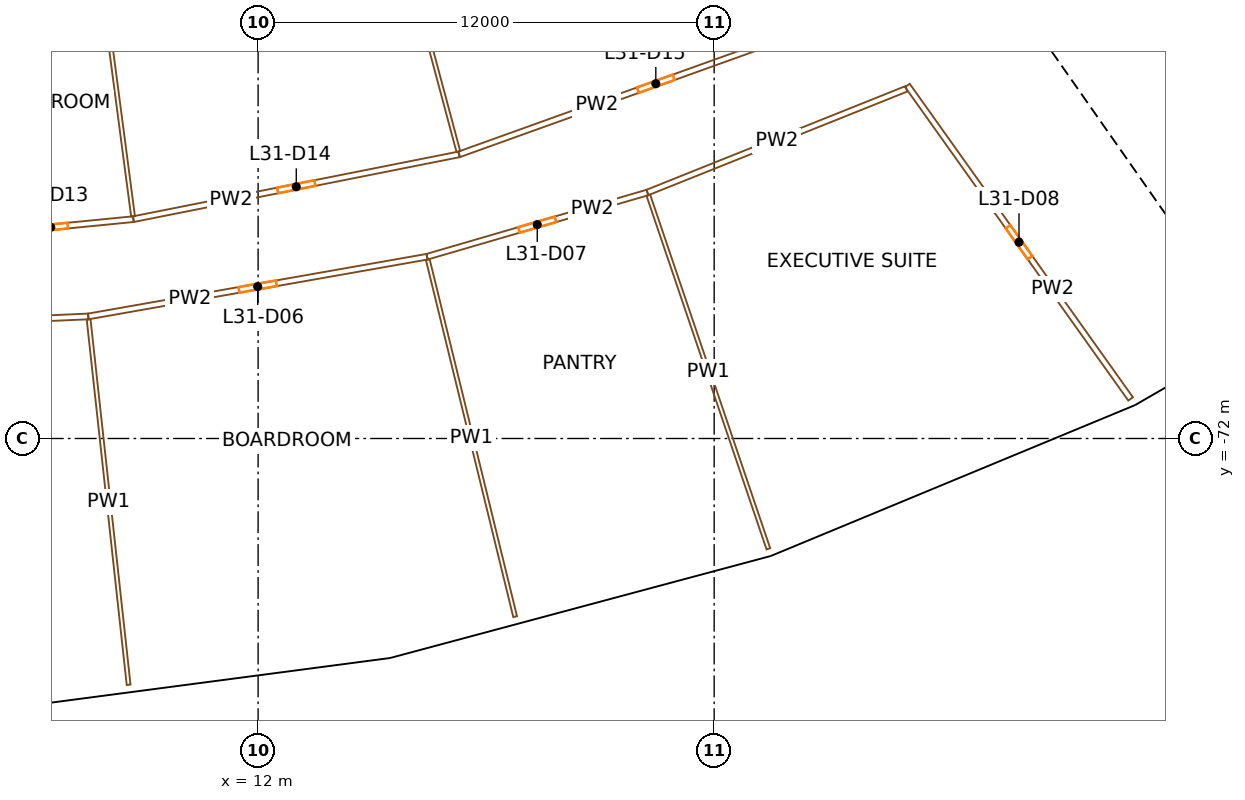
"""IFC4 building model, lengths in metres.
Left out: names, types, materials, properties, quantities, classifications, styles, units other than length and angle.
Written with IfcOpenShell. Run it as: python <this file> out.ifc"""

import sys

from ifc_helpers import new_model, si_unit, direction, frame, frame_2d, origin, origin_2d, place, context, subcontext, project, spatial, rectangle, extrude, element, fill, save


model = new_model("IFC4")
c1 = context("Model", 3, precision=1e-05, world=origin(), true_north=direction((0.0, 1.0)))
c2 = subcontext(c1, "Body", "Model", "MODEL_VIEW")
j1 = project(units=[si_unit("LENGTHUNIT", "METRE"), si_unit("PLANEANGLEUNIT", "RADIAN")], contexts=[c1])
p1 = place(None, origin())
s1 = spatial("IfcSite", under=j1, at=p1, CompositionType="ELEMENT")
p2 = place(p1, origin())
s2 = spatial("IfcBuilding", under=s1, at=p2, CompositionType="ELEMENT")
p3 = place(p2, frame((0.0, 0.0, 136.7)))
s3 = spatial("IfcBuildingStorey", under=s2, at=p3, CompositionType="ELEMENT", Elevation=136.7)
for number, where, z_axis, x_axis in (
    (1, (15.168, -76.256, 0.0), (0.0, 0.0, 1.0), (0.981, 0.195, 0.0)),
    (2, (24.992, -73.624, 0.0), (0.0, 0.0, 1.0), (0.947, 0.321, 0.0)),
    (3, (34.388, -69.732, 0.0), (0.0, 0.0, 1.0), (0.897, 0.442, 0.0)),
):
    element("IfcColumn", number, at=place(p3, frame(where, z_axis=z_axis, x_axis=x_axis)), inside=s3, PredefinedType="COLUMN", context=c2, shape_type="SweptSolid", body=[
        extrude(rectangle(XDim=1.2, YDim=1.5, at=origin_2d()), origin(), (0.0, 0.0, 1.0), 3.8),
    ])
p4 = place(p3, frame((36.717, -66.337, 0.0), z_axis=(0.0, 0.0, 1.0), x_axis=(-0.573577477574, 0.819151315216, 0.0)))
e4 = element("IfcWall", 4, at=p4, inside=s3, PredefinedType="SHEAR", context=c2, shape_type="SweptSolid", body=[
    extrude(rectangle(XDim=14.8, YDim=0.9, at=frame_2d((7.4, 0.0))), origin(), (0.0, 0.0, 1.0), 3.5),
])
p5 = place(p4, frame((6.2, 0.0, 0.0)))
e5 = element("IfcOpeningElement", 5, at=p5, cuts=e4, PredefinedType="OPENING", context=c2, shape_type="SweptSolid", body=[
    extrude(rectangle(XDim=2.4, YDim=2.1, at=frame_2d((1.2, 1.05))), frame((0.0, 0.46, 0.0), z_axis=(0.0, -1.0, 0.0), x_axis=(1.0, 0.0, 0.0)), (0.0, 0.0, 1.0), 0.92),
])
p6 = place(p3, frame((35.221, -63.417, 0.0), z_axis=(0.0, 0.0, 1.0), x_axis=(0.819166993208, 0.573555086491, 0.0)))
e6 = element("IfcWall", 6, at=p6, inside=s3, PredefinedType="SOLIDWALL", context=c2, shape_type="SweptSolid", body=[
    extrude(rectangle(XDim=7.95, YDim=0.3, at=frame_2d((3.975, 0.0))), origin(), (0.0, 0.0, 1.0), 3.5),
])
p7 = place(p3, frame((7.532, -68.789, 0.0), z_axis=(0.0, 0.0, 1.0), x_axis=(-0.999048509506, -0.043612792308, 0.0)))
e7 = element("IfcWall", 7, at=p7, inside=s3, PredefinedType="PARTITIONING", context=c2, shape_type="SweptSolid", body=[
    extrude(rectangle(XDim=9.052, YDim=0.15, at=frame_2d((4.526, 0.0))), origin(), (0.0, 0.0, 1.0), 2.4),
])
p8 = place(p7, frame((4.026, 0.0, 0.0)))
e8 = element("IfcOpeningElement", 8, at=p8, cuts=e7, PredefinedType="OPENING", context=c2, shape_type="SweptSolid", body=[
    extrude(rectangle(XDim=1.0, YDim=2.1, at=frame_2d((0.5, 1.05))), frame((0.0, 0.085, 0.0), z_axis=(0.0, -1.0, 0.0), x_axis=(1.0, 0.0, 0.0)), (0.0, 0.0, 1.0), 0.17),
])
p9 = place(p3, frame((4.369, -66.657, 0.0), z_axis=(0.0, 0.0, 1.0), x_axis=(0.995184826457, 0.098016127192, 0.0)))
e9 = element("IfcWall", 9, at=p9, inside=s3, PredefinedType="PARTITIONING", context=c2, shape_type="SweptSolid", body=[
    extrude(rectangle(XDim=4.371, YDim=0.15, at=frame_2d((2.186, 0.0))), origin(), (0.0, 0.0, 1.0), 2.4),
])
p10 = place(p9, frame((1.736, 0.0, 0.0)))
e10 = element("IfcOpeningElement", 10, at=p10, cuts=e9, PredefinedType="OPENING", context=c2, shape_type="SweptSolid", body=[
    extrude(rectangle(XDim=0.9, YDim=2.1, at=frame_2d((0.45, 1.05))), frame((0.0, 0.085, 0.0), z_axis=(0.0, -1.0, 0.0), x_axis=(1.0, 0.0, 0.0)), (0.0, 0.0, 1.0), 0.17),
])
p11 = place(p3, frame((7.437, -56.491, 0.0), z_axis=(0.0, 0.0, 1.0), x_axis=(0.13053421433, -0.99144380521, 0.0)))
e11 = element("IfcWall", 11, at=p11, inside=s3, PredefinedType="PARTITIONING", context=c2, shape_type="SweptSolid", body=[
    extrude(rectangle(XDim=9.746, YDim=0.1, at=frame_2d((4.873, 0.0))), origin(), (0.0, 0.0, 1.0), 2.4),
])
p12 = place(p3, frame((16.446, -67.217, 0.0), z_axis=(0.0, 0.0, 1.0), x_axis=(-0.984813412134, -0.173616080133, 0.0)))
e12 = element("IfcWall", 12, at=p12, inside=s3, PredefinedType="PARTITIONING", context=c2, shape_type="SweptSolid", body=[
    extrude(rectangle(XDim=9.052, YDim=0.15, at=frame_2d((4.526, 0.0))), origin(), (0.0, 0.0, 1.0), 2.4),
])
p13 = place(p12, frame((4.026, 0.0, 0.0)))
e13 = element("IfcOpeningElement", 13, at=p13, cuts=e12, PredefinedType="OPENING", context=c2, shape_type="SweptSolid", body=[
    extrude(rectangle(XDim=1.0, YDim=2.1, at=frame_2d((0.5, 1.05))), frame((0.0, 0.085, 0.0), z_axis=(0.0, -1.0, 0.0), x_axis=(1.0, 0.0, 0.0)), (0.0, 0.0, 1.0), 0.17),
])
p14 = place(p3, frame((8.593, -78.48, 0.0), z_axis=(0.0, 0.0, 1.0), x_axis=(-0.10884699726, 0.994058514972, 0.0)))
e14 = element("IfcWall", 14, at=p14, inside=s3, PredefinedType="PARTITIONING", context=c2, shape_type="SweptSolid", body=[
    extrude(rectangle(XDim=9.674, YDim=0.1, at=frame_2d((4.837, 0.0))), origin(), (0.0, 0.0, 1.0), 2.4),
])
p15 = place(p3, frame((8.719, -66.229, 0.0), z_axis=(0.0, 0.0, 1.0), x_axis=(0.980786466832, 0.195084357342, 0.0)))
e15 = element("IfcWall", 15, at=p15, inside=s3, PredefinedType="PARTITIONING", context=c2, shape_type="SweptSolid", body=[
    extrude(rectangle(XDim=8.738, YDim=0.15, at=frame_2d((4.369, 0.0))), origin(), (0.0, 0.0, 1.0), 2.4),
])
p16 = place(p15, frame((3.869, 0.0, 0.0)))
e16 = element("IfcOpeningElement", 16, at=p16, cuts=e15, PredefinedType="OPENING", context=c2, shape_type="SweptSolid", body=[
    extrude(rectangle(XDim=1.0, YDim=2.1, at=frame_2d((0.5, 1.05))), frame((0.0, 0.085, 0.0), z_axis=(0.0, -1.0, 0.0), x_axis=(1.0, 0.0, 0.0)), (0.0, 0.0, 1.0), 0.17),
])
p17 = place(p3, frame((14.747, -55.037, 0.0), z_axis=(0.0, 0.0, 1.0), x_axis=(0.258833329344, -0.965921998725, 0.0)))
e17 = element("IfcWall", 17, at=p17, inside=s3, PredefinedType="PARTITIONING", context=c2, shape_type="SweptSolid", body=[
    extrude(rectangle(XDim=9.746, YDim=0.1, at=frame_2d((4.873, 0.0))), origin(), (0.0, 0.0, 1.0), 2.4),
])
p18 = place(p3, frame((22.244, -65.528, 0.0), z_axis=(0.0, 0.0, 1.0), x_axis=(-0.960056580345, -0.279805937279, 0.0)))
e18 = element("IfcWall", 18, at=p18, inside=s3, PredefinedType="PARTITIONING", context=c2, shape_type="SweptSolid", body=[
    extrude(rectangle(XDim=6.039, YDim=0.15, at=frame_2d((3.02, 0.0))), origin(), (0.0, 0.0, 1.0), 2.4),
])
p19 = place(p18, frame((2.52, 0.0, 0.0)))
e19 = element("IfcOpeningElement", 19, at=p19, cuts=e18, PredefinedType="OPENING", context=c2, shape_type="SweptSolid", body=[
    extrude(rectangle(XDim=1.0, YDim=2.1, at=frame_2d((0.5, 1.05))), frame((0.0, 0.085, 0.0), z_axis=(0.0, -1.0, 0.0), x_axis=(1.0, 0.0, 0.0)), (0.0, 0.0, 1.0), 0.17),
])
p20 = place(p3, frame((17.289, -64.524, 0.0), z_axis=(0.0, 0.0, 1.0), x_axis=(0.941150861554, 0.337986768669, 0.0)))
e20 = element("IfcWall", 20, at=p20, inside=s3, PredefinedType="PARTITIONING", context=c2, shape_type="SweptSolid", body=[
    extrude(rectangle(XDim=10.998, YDim=0.15, at=frame_2d((5.499, 0.0))), origin(), (0.0, 0.0, 1.0), 2.4),
])
p21 = place(p20, frame((4.999, 0.0, 0.0)))
e21 = element("IfcOpeningElement", 21, at=p21, cuts=e20, PredefinedType="OPENING", context=c2, shape_type="SweptSolid", body=[
    extrude(rectangle(XDim=1.0, YDim=2.1, at=frame_2d((0.5, 1.05))), frame((0.0, 0.085, 0.0), z_axis=(0.0, -1.0, 0.0), x_axis=(1.0, 0.0, 0.0)), (0.0, 0.0, 1.0), 0.17),
])
p22 = place(p3, frame((18.763, -76.687, 0.0), z_axis=(0.0, 0.0, 1.0), x_axis=(-0.237657357205, 0.971349051869, 0.0)))
e22 = element("IfcWall", 22, at=p22, inside=s3, PredefinedType="PARTITIONING", context=c2, shape_type="SweptSolid", body=[
    extrude(rectangle(XDim=9.674, YDim=0.1, at=frame_2d((4.837, 0.0))), origin(), (0.0, 0.0, 1.0), 2.4),
])
p23 = place(p3, frame((22.244, -65.528, 0.0), z_axis=(0.0, 0.0, 1.0), x_axis=(0.92834358791, 0.371723261025, 0.0)))
e23 = element("IfcWall", 23, at=p23, inside=s3, PredefinedType="PARTITIONING", context=c2, shape_type="SweptSolid", body=[
    extrude(rectangle(XDim=7.34, YDim=0.15, at=frame_2d((3.67, 0.0))), origin(), (0.0, 0.0, 1.0), 2.4),
])
p24 = place(p3, frame((25.426, -74.902, 0.0), z_axis=(0.0, 0.0, 1.0), x_axis=(-0.3214264651, 0.94693454237, 0.0)))
e24 = element("IfcWall", 24, at=p24, inside=s3, PredefinedType="PARTITIONING", context=c2, shape_type="SweptSolid", body=[
    extrude(rectangle(XDim=9.825, YDim=0.1, at=frame_2d((4.912, 0.0))), origin(), (0.0, 0.0, 1.0), 2.4),
])
p25 = place(p3, frame((34.958, -70.959, 0.0), z_axis=(0.0, 0.0, 1.0), x_axis=(-0.580031092611, 0.814594335608, 0.0)))
e25 = element("IfcWall", 25, at=p25, inside=s3, PredefinedType="PARTITIONING", context=c2, shape_type="SweptSolid", body=[
    extrude(rectangle(XDim=10.126, YDim=0.15, at=frame_2d((5.063, 0.0))), origin(), (0.0, 0.0, 1.0), 2.4),
])
p26 = place(p25, frame((4.563, 0.0, 0.0)))
e26 = element("IfcOpeningElement", 26, at=p26, cuts=e25, PredefinedType="OPENING", context=c2, shape_type="SweptSolid", body=[
    extrude(rectangle(XDim=1.0, YDim=2.1, at=frame_2d((0.5, 1.05))), frame((0.0, 0.085, 0.0), z_axis=(0.0, -1.0, 0.0), x_axis=(1.0, 0.0, 0.0)), (0.0, 0.0, 1.0), 0.17),
])
p27 = place(p13, origin())
e27 = element("IfcDoor", 27, at=p27, inside=s3, OperationType="SINGLE_SWING_RIGHT", PredefinedType="DOOR", context=c2, shape_type="SweptSolid", body=[
    extrude(rectangle(XDim=1.0, YDim=2.1, at=frame_2d((0.5, 1.05))), frame((0.0, 0.025, 0.0), z_axis=(0.0, -1.0, 0.0), x_axis=(1.0, 0.0, 0.0)), (0.0, 0.0, 1.0), 0.05),
])
fill(e13, e27)
p28 = place(p19, origin())
e28 = element("IfcDoor", 28, at=p28, inside=s3, OperationType="SINGLE_SWING_RIGHT", PredefinedType="DOOR", context=c2, shape_type="SweptSolid", body=[
    extrude(rectangle(XDim=1.0, YDim=2.1, at=frame_2d((0.5, 1.05))), frame((0.0, 0.025, 0.0), z_axis=(0.0, -1.0, 0.0), x_axis=(1.0, 0.0, 0.0)), (0.0, 0.0, 1.0), 0.05),
])
fill(e19, e28)
p29 = place(p26, origin())
e29 = element("IfcDoor", 29, at=p29, inside=s3, OperationType="SINGLE_SWING_RIGHT", PredefinedType="DOOR", context=c2, shape_type="SweptSolid", body=[
    extrude(rectangle(XDim=1.0, YDim=2.1, at=frame_2d((0.5, 1.05))), frame((0.0, 0.025, 0.0), z_axis=(0.0, -1.0, 0.0), x_axis=(1.0, 0.0, 0.0)), (0.0, 0.0, 1.0), 0.05),
])
fill(e26, e29)
p30 = place(p10, origin())
e30 = element("IfcDoor", 30, at=p30, inside=s3, OperationType="SINGLE_SWING_RIGHT", PredefinedType="DOOR", context=c2, shape_type="SweptSolid", body=[
    extrude(rectangle(XDim=0.9, YDim=2.1, at=frame_2d((0.45, 1.05))), frame((0.0, 0.025, 0.0), z_axis=(0.0, -1.0, 0.0), x_axis=(1.0, 0.0, 0.0)), (0.0, 0.0, 1.0), 0.05),
])
fill(e10, e30)
p31 = place(p16, origin())
e31 = element("IfcDoor", 31, at=p31, inside=s3, OperationType="SINGLE_SWING_RIGHT", PredefinedType="DOOR", context=c2, shape_type="SweptSolid", body=[
    extrude(rectangle(XDim=1.0, YDim=2.1, at=frame_2d((0.5, 1.05))), frame((0.0, 0.025, 0.0), z_axis=(0.0, -1.0, 0.0), x_axis=(1.0, 0.0, 0.0)), (0.0, 0.0, 1.0), 0.05),
])
fill(e16, e31)
p32 = place(p21, origin())
e32 = element("IfcDoor", 32, at=p32, inside=s3, OperationType="SINGLE_SWING_RIGHT", PredefinedType="DOOR", context=c2, shape_type="SweptSolid", body=[
    extrude(rectangle(XDim=1.0, YDim=2.1, at=frame_2d((0.5, 1.05))), frame((0.0, 0.025, 0.0), z_axis=(0.0, -1.0, 0.0), x_axis=(1.0, 0.0, 0.0)), (0.0, 0.0, 1.0), 0.05),
])
fill(e21, e32)
save(model, sys.argv[1])
